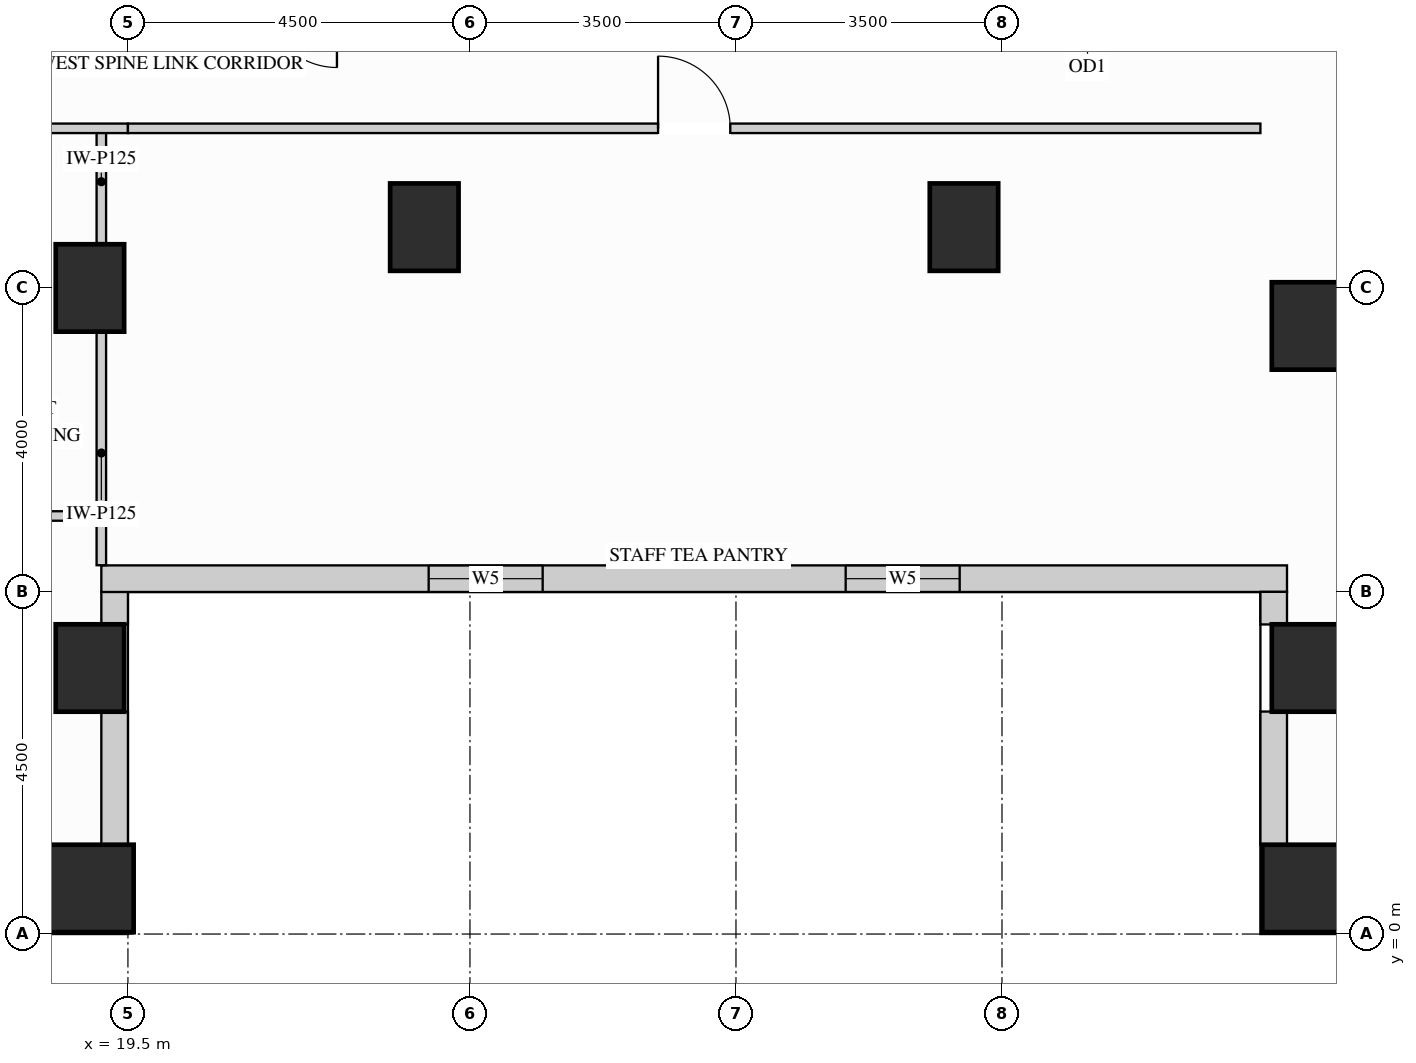
"""IFC4 building model, lengths in metres.
Left out: names, types, materials, properties, quantities, classifications, styles, units other than length and angle.
Written with IfcOpenShell. Run it as: python <this file> out.ifc"""

import sys

from ifc_helpers import new_model, si_unit, direction, frame, frame_2d, origin, origin_2d, place, context, subcontext, project, spatial, rectangle, extrude, source, transform, mapped, element, fill, save


model = new_model("IFC4")
c1 = context("Model", 3, precision=1e-05, world=origin(), true_north=direction((0.0, 1.0)))
c2 = subcontext(c1, "Body", "Model", "MODEL_VIEW")
j1 = project(units=[si_unit("LENGTHUNIT", "METRE"), si_unit("PLANEANGLEUNIT", "RADIAN")], contexts=[c1])
p1 = place(None, origin())
s1 = spatial("IfcSite", under=j1, at=p1, CompositionType="ELEMENT")
p2 = place(p1, origin())
s2 = spatial("IfcBuilding", under=s1, at=p2, CompositionType="ELEMENT")
p3 = place(p2, frame((0.0, 0.0, 81.0)))
s3 = spatial("IfcBuildingStorey", under=s2, at=p3, CompositionType="ELEMENT", Elevation=81.0)
m1 = source(origin(), c2, "Body", "SweptSolid", [
    extrude(rectangle(XDim=0.9, YDim=1.15, at=origin_2d()), origin(), (0.0, 0.0, 1.0), 3.38),
])
for number, where, z_axis, x_axis in (
    (1, (19.0, 3.5, 0.0), (0.0, 0.0, 1.0), (1.0, 0.0, 0.0)),
    (2, (19.0, 8.5, 0.0), (0.0, 0.0, 1.0), (1.0, 0.0, 0.0)),
    (3, (35.0, 3.5, 0.0), (0.0, 0.0, 1.0), (1.0, 0.0, 0.0)),
    (4, (35.0, 8.0, 0.0), (0.0, 0.0, 1.0), (1.0, 0.0, 0.0)),
    (5, (23.4, 9.3, 0.0), (0.0, 0.0, 1.0), (1.0, 0.0, 0.0)),
    (6, (30.5, 9.3, 0.0), (0.0, 0.0, 1.0), (1.0, 0.0, 0.0)),
):
    element("IfcColumn", number, at=place(p3, frame(where, z_axis=z_axis, x_axis=x_axis)), inside=s3, PredefinedType="COLUMN", context=c2, shape_type="MappedRepresentation", body=[
        mapped(m1, transform((0.0, 0.0, 0.0), x_axis=(1.0, 0.0, 0.0), y_axis=(0.0, 1.0, 0.0), z_axis=(0.0, 0.0, 1.0))),
    ])
m2 = source(origin(), c2, "Body", "SweptSolid", [
    extrude(rectangle(XDim=1.15, YDim=1.15, at=origin_2d()), origin(), (0.0, 0.0, 1.0), 3.38),
])
for number, where, z_axis, x_axis in (
    (7, (19.0, 0.6, 0.0), (0.0, 0.0, 1.0), (1.0, 0.0, 0.0)),
    (8, (35.0, 0.6, 0.0), (0.0, 0.0, 1.0), (1.0, 0.0, 0.0)),
):
    element("IfcColumn", number, at=place(p3, frame(where, z_axis=z_axis, x_axis=x_axis)), inside=s3, PredefinedType="COLUMN", context=c2, shape_type="MappedRepresentation", body=[
        mapped(m2, transform((0.0, 0.0, 0.0), x_axis=(1.0, 0.0, 0.0), y_axis=(0.0, 1.0, 0.0), z_axis=(0.0, 0.0, 1.0))),
    ])
m3 = source(origin(), c2, "Body", "SweptSolid", [
    extrude(rectangle(XDim=1.754, YDim=0.35, at=frame_2d((0.877, 0.0))), origin(), (0.0, 0.0, 1.0), 2.519),
])
p4 = place(p3, frame((19.325, 1.173, 0.0), z_axis=(0.0, 0.0, 1.0), x_axis=(0.0, 1.0, 0.0)))
e9 = element("IfcWall", 9, at=p4, inside=s3, PredefinedType="SOLIDWALL", context=c2, shape_type="MappedRepresentation", body=[
    mapped(m3, transform((0.0, 0.0, 0.0), x_axis=(1.0, 0.0, 0.0), y_axis=(0.0, 1.0, 0.0), z_axis=(0.0, 0.0, 1.0))),
])
m4 = source(origin(), c2, "Body", "SweptSolid", [
    extrude(rectangle(XDim=0.429, YDim=0.35, at=frame_2d((0.214, 0.0))), origin(), (0.0, 0.0, 1.0), 2.677),
])
p5 = place(p3, frame((19.325, 4.073, 0.0), z_axis=(0.0, 0.0, 1.0), x_axis=(0.0, 1.0, 0.0)))
e10 = element("IfcWall", 10, at=p5, inside=s3, PredefinedType="SOLIDWALL", context=c2, shape_type="MappedRepresentation", body=[
    mapped(m4, transform((0.0, 0.0, 0.0), x_axis=(1.0, 0.0, 0.0), y_axis=(0.0, 1.0, 0.0), z_axis=(0.0, 0.0, 1.0))),
])
p6 = place(p3, frame((19.15, 4.675, 0.0), z_axis=(0.0, 0.0, 1.0), x_axis=(1.0, 0.0, 0.0)))
e11 = element("IfcWall", 11, at=p6, inside=s3, PredefinedType="SOLIDWALL", context=c2, shape_type="SweptSolid", body=[
    extrude(rectangle(XDim=15.6, YDim=0.35, at=frame_2d((7.8, 0.0))), origin(), (0.0, 0.0, 1.0), 3.365),
])
p7 = place(p6, frame((4.307, 0.0, 0.78)))
e12 = element("IfcOpeningElement", 12, at=p7, cuts=e11, PredefinedType="OPENING", context=c2, shape_type="SweptSolid", body=[
    extrude(rectangle(XDim=1.5, YDim=2.0, at=frame_2d((0.75, 1.0))), frame((0.0, 0.185, 0.0), z_axis=(0.0, -1.0, 0.0), x_axis=(1.0, 0.0, 0.0)), (0.0, 0.0, 1.0), 0.37),
])
p8 = place(p6, frame((9.793, 0.0, 0.78)))
e13 = element("IfcOpeningElement", 13, at=p8, cuts=e11, PredefinedType="OPENING", context=c2, shape_type="SweptSolid", body=[
    extrude(rectangle(XDim=1.5, YDim=2.0, at=frame_2d((0.75, 1.0))), frame((0.0, 0.185, 0.0), z_axis=(0.0, -1.0, 0.0), x_axis=(1.0, 0.0, 0.0)), (0.0, 0.0, 1.0), 0.37),
])
m5 = source(origin(), c2, "Body", "SweptSolid", [
    extrude(rectangle(XDim=0.429, YDim=0.35, at=frame_2d((0.214, 0.0))), origin(), (0.0, 0.0, 1.0), 3.365),
])
p9 = place(p3, frame((34.575, 4.502, 0.0), z_axis=(0.0, 0.0, 1.0), x_axis=(0.0, -1.0, 0.0)))
e14 = element("IfcWall", 14, at=p9, inside=s3, PredefinedType="SOLIDWALL", context=c2, shape_type="MappedRepresentation", body=[
    mapped(m5, transform((0.0, 0.0, 0.0), x_axis=(1.0, 0.0, 0.0), y_axis=(0.0, 1.0, 0.0), z_axis=(0.0, 0.0, 1.0))),
])
m6 = source(origin(), c2, "Body", "SweptSolid", [
    extrude(rectangle(XDim=1.754, YDim=0.35, at=frame_2d((0.877, 0.0))), origin(), (0.0, 0.0, 1.0), 3.365),
])
p10 = place(p3, frame((34.575, 2.927, 0.0), z_axis=(0.0, 0.0, 1.0), x_axis=(0.0, -1.0, 0.0)))
e15 = element("IfcWall", 15, at=p10, inside=s3, PredefinedType="SOLIDWALL", context=c2, shape_type="MappedRepresentation", body=[
    mapped(m6, transform((0.0, 0.0, 0.0), x_axis=(1.0, 0.0, 0.0), y_axis=(0.0, 1.0, 0.0), z_axis=(0.0, 0.0, 1.0))),
])
m7 = source(origin(), c2, "Body", "SweptSolid", [
    extrude(rectangle(XDim=3.058, YDim=0.125, at=frame_2d((1.529, 0.0))), origin(), (0.0, 0.0, 1.0), 2.677),
])
p11 = place(p3, frame((19.15, 4.852, 0.0), z_axis=(0.0, 0.0, 1.0), x_axis=(0.0, 1.0, 0.0)))
e16 = element("IfcWall", 16, at=p11, inside=s3, PredefinedType="PARTITIONING", context=c2, shape_type="MappedRepresentation", body=[
    mapped(m7, transform((0.0, 0.0, 0.0), x_axis=(1.0, 0.0, 0.0), y_axis=(0.0, 1.0, 0.0), z_axis=(0.0, 0.0, 1.0))),
])
m8 = source(origin(), c2, "Body", "SweptSolid", [
    extrude(rectangle(XDim=1.51, YDim=0.125, at=frame_2d((0.755, 0.0))), origin(), (0.0, 0.0, 1.0), 2.677),
])
p12 = place(p3, frame((19.15, 9.09, 0.0), z_axis=(0.0, 0.0, 1.0), x_axis=(0.0, 1.0, 0.0)))
e17 = element("IfcWall", 17, at=p12, inside=s3, PredefinedType="PARTITIONING", context=c2, shape_type="MappedRepresentation", body=[
    mapped(m8, transform((0.0, 0.0, 0.0), x_axis=(1.0, 0.0, 0.0), y_axis=(0.0, 1.0, 0.0), z_axis=(0.0, 0.0, 1.0))),
])
m9 = source(origin(), c2, "Body", "SweptSolid", [
    extrude(rectangle(XDim=2.45, YDim=0.125, at=frame_2d((1.225, 0.0))), origin(), (0.0, 0.0, 1.0), 3.365),
])
p13 = place(p3, frame((17.05, 10.6, 0.0), z_axis=(0.0, 0.0, 1.0), x_axis=(1.0, 0.0, 0.0)))
e18 = element("IfcWall", 18, at=p13, inside=s3, PredefinedType="PARTITIONING", context=c2, shape_type="MappedRepresentation", body=[
    mapped(m9, transform((0.0, 0.0, 0.0), x_axis=(1.0, 0.0, 0.0), y_axis=(0.0, 1.0, 0.0), z_axis=(0.0, 0.0, 1.0))),
])
p14 = place(p3, frame((19.5, 10.6, 0.0), z_axis=(0.0, 0.0, 1.0), x_axis=(1.0, 0.0, 0.0)))
e19 = element("IfcWall", 19, at=p14, inside=s3, PredefinedType="PARTITIONING", context=c2, shape_type="SweptSolid", body=[
    extrude(rectangle(XDim=14.9, YDim=0.125, at=frame_2d((7.45, 0.0))), origin(), (0.0, 0.0, 1.0), 3.365),
])
p15 = place(p14, frame((6.975, 0.0, 0.0)))
e20 = element("IfcOpeningElement", 20, at=p15, cuts=e19, PredefinedType="OPENING", context=c2, shape_type="SweptSolid", body=[
    extrude(rectangle(XDim=0.95, YDim=2.15, at=frame_2d((0.475, 1.075))), frame((0.0, 0.073, 0.0), z_axis=(0.0, -1.0, 0.0), x_axis=(1.0, 0.0, 0.0)), (0.0, 0.0, 1.0), 0.145),
])
m10 = source(origin(), c2, "Body", "SweptSolid", [
    extrude(rectangle(XDim=2.1, YDim=0.125, at=frame_2d((1.05, 0.0))), origin(), (0.0, 0.0, 1.0), 3.365),
])
p16 = place(p3, frame((17.05, 5.5, 0.0), z_axis=(0.0, 0.0, 1.0), x_axis=(1.0, 0.0, 0.0)))
e21 = element("IfcWall", 21, at=p16, inside=s3, PredefinedType="PARTITIONING", context=c2, shape_type="MappedRepresentation", body=[
    mapped(m10, transform((0.0, 0.0, 0.0), x_axis=(1.0, 0.0, 0.0), y_axis=(0.0, 1.0, 0.0), z_axis=(0.0, 0.0, 1.0))),
])
m11 = source(origin(), c2, "Body", "SweptSolid", [
    extrude(rectangle(XDim=0.95, YDim=2.15, at=frame_2d((0.475, 1.075))), frame((0.0, 0.025, 0.0), z_axis=(0.0, -1.0, 0.0), x_axis=(1.0, 0.0, 0.0)), (0.0, 0.0, 1.0), 0.05),
])
p17 = place(p15, origin())
e22 = element("IfcDoor", 22, at=p17, inside=s3, OperationType="SINGLE_SWING_LEFT", PredefinedType="DOOR", context=c2, shape_type="MappedRepresentation", body=[
    mapped(m11, transform((0.0, 0.0, 0.0), x_axis=(1.0, 0.0, 0.0), y_axis=(0.0, 1.0, 0.0), z_axis=(0.0, 0.0, 1.0))),
])
fill(e20, e22)
m12 = source(origin(), c2, "Body", "SweptSolid", [
    extrude(rectangle(XDim=1.5, YDim=2.0, at=frame_2d((0.75, 1.0))), frame((0.0, 0.03, 0.0), z_axis=(0.0, -1.0, 0.0), x_axis=(1.0, 0.0, 0.0)), (0.0, 0.0, 1.0), 0.06),
])
p18 = place(p7, origin())
e23 = element("IfcWindow", 23, at=p18, inside=s3, PartitioningType="SINGLE_PANEL", PredefinedType="WINDOW", context=c2, shape_type="MappedRepresentation", body=[
    mapped(m12, transform((0.0, 0.0, 0.0), x_axis=(1.0, 0.0, 0.0), y_axis=(0.0, 1.0, 0.0), z_axis=(0.0, 0.0, 1.0))),
])
fill(e12, e23)
p19 = place(p8, origin())
e24 = element("IfcWindow", 24, at=p19, inside=s3, PartitioningType="SINGLE_PANEL", PredefinedType="WINDOW", context=c2, shape_type="MappedRepresentation", body=[
    mapped(m12, transform((0.0, 0.0, 0.0), x_axis=(1.0, 0.0, 0.0), y_axis=(0.0, 1.0, 0.0), z_axis=(0.0, 0.0, 1.0))),
])
fill(e13, e24)
save(model, sys.argv[1])
